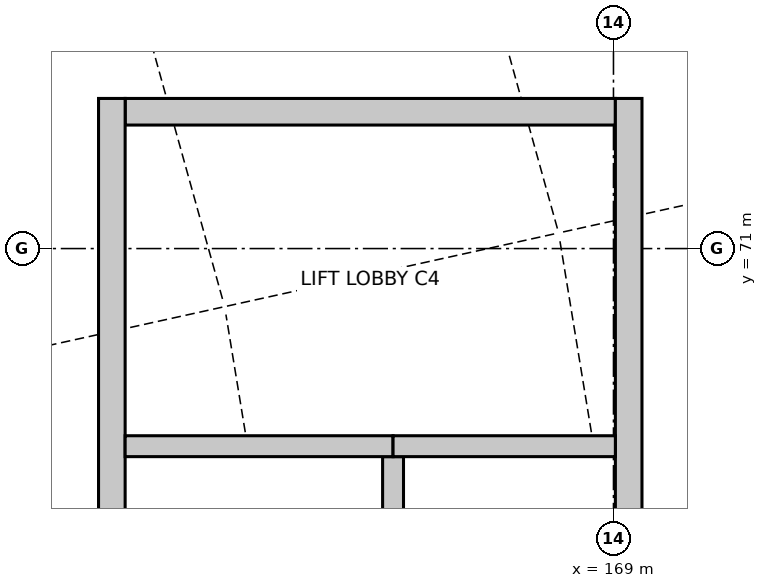
"""IFC4 building model, lengths in metres.
Left out: names, types, materials, properties, quantities, classifications, styles, units other than length and angle.
Written with IfcOpenShell. Run it as: python <this file> out.ifc"""

import sys

from ifc_helpers import new_model, si_unit, direction, frame, frame_2d, origin, place, context, subcontext, project, spatial, rectangle, extrude, element, fill, save


model = new_model("IFC4")
c1 = context("Model", 3, precision=1e-05, world=origin(), true_north=direction((0.0, 1.0)))
c2 = subcontext(c1, "Body", "Model", "MODEL_VIEW")
j1 = project(units=[si_unit("LENGTHUNIT", "METRE"), si_unit("PLANEANGLEUNIT", "RADIAN")], contexts=[c1])
p1 = place(None, origin())
s1 = spatial("IfcSite", under=j1, at=p1, CompositionType="ELEMENT")
p2 = place(p1, origin())
s2 = spatial("IfcBuilding", under=s1, at=p2, CompositionType="ELEMENT")
p3 = place(p2, frame((0.0, 0.0, 9.6)))
s3 = spatial("IfcBuildingStorey", under=s2, at=p3, CompositionType="ELEMENT", Elevation=9.6)
p4 = place(p3, frame((162.575, 72.8, 0.0), z_axis=(0.0, 0.0, 1.0), x_axis=(1.0, 0.0, 0.0)))
e1 = element("IfcWall", 1, at=p4, inside=s3, PredefinedType="SHEAR", context=c2, shape_type="SweptSolid", body=[
    extrude(rectangle(XDim=6.45, YDim=0.35, at=frame_2d((3.225, 0.0))), origin(), (0.0, 0.0, 1.0), 4.55),
])
p5 = place(p4, frame((2.5, 0.0, 0.0)))
e2 = element("IfcOpeningElement", 2, at=p5, cuts=e1, PredefinedType="OPENING", context=c2, shape_type="SweptSolid", body=[
    extrude(rectangle(XDim=1.45, YDim=2.2, at=frame_2d((0.725, 1.1))), frame((0.0, 0.185, 0.0), z_axis=(0.0, -1.0, 0.0), x_axis=(1.0, 0.0, 0.0)), (0.0, 0.0, 1.0), 0.37),
])
for number, where, z_axis, x_axis in (
    (3, (162.4, 61.375, 0.0), (0.0, 0.0, 1.0), (0.0, 1.0, 0.0)),
    (4, (169.2, 61.375, 0.0), (0.0, 0.0, 1.0), (0.0, 1.0, 0.0)),
):
    element("IfcWall", number, at=place(p3, frame(where, z_axis=z_axis, x_axis=x_axis)), inside=s3, PredefinedType="SHEAR", context=c2, shape_type="SweptSolid", body=[
        extrude(rectangle(XDim=11.6, YDim=0.35, at=frame_2d((5.8, 0.0))), origin(), (0.0, 0.0, 1.0), 4.55),
    ])
p6 = place(p3, frame((166.1, 61.375, 0.0), z_axis=(0.0, 0.0, 1.0), x_axis=(0.0, 1.0, 0.0)))
e5 = element("IfcWall", 5, at=p6, inside=s3, PredefinedType="SHEAR", context=c2, shape_type="SweptSolid", body=[
    extrude(rectangle(XDim=6.887, YDim=0.275, at=frame_2d((3.444, 0.0))), origin(), (0.0, 0.0, 1.0), 4.55),
])
p7 = place(p3, frame((162.575, 68.4, 0.0), z_axis=(0.0, 0.0, 1.0), x_axis=(1.0, 0.0, 0.0)))
e6 = element("IfcWall", 6, at=p7, inside=s3, PredefinedType="SHEAR", context=c2, shape_type="SweptSolid", body=[
    extrude(rectangle(XDim=3.525, YDim=0.275, at=frame_2d((1.763, 0.0))), origin(), (0.0, 0.0, 1.0), 4.55),
])
p8 = place(p7, frame((1.785, 0.0, 0.0)))
e7 = element("IfcOpeningElement", 7, at=p8, cuts=e6, PredefinedType="OPENING", context=c2, shape_type="SweptSolid", body=[
    extrude(rectangle(XDim=1.25, YDim=2.15, at=frame_2d((0.625, 1.075))), frame((0.0, 0.147, 0.0), z_axis=(0.0, -1.0, 0.0), x_axis=(1.0, 0.0, 0.0)), (0.0, 0.0, 1.0), 0.295),
])
p9 = place(p3, frame((166.1, 68.4, 0.0), z_axis=(0.0, 0.0, 1.0), x_axis=(1.0, 0.0, 0.0)))
e8 = element("IfcWall", 8, at=p9, inside=s3, PredefinedType="SHEAR", context=c2, shape_type="SweptSolid", body=[
    extrude(rectangle(XDim=2.925, YDim=0.275, at=frame_2d((1.462, 0.0))), origin(), (0.0, 0.0, 1.0), 4.55),
])
p10 = place(p9, frame((0.982, 0.0, 0.0)))
e9 = element("IfcOpeningElement", 9, at=p10, cuts=e8, PredefinedType="OPENING", context=c2, shape_type="SweptSolid", body=[
    extrude(rectangle(XDim=1.1, YDim=2.15, at=frame_2d((0.55, 1.075))), frame((0.0, 0.147, 0.0), z_axis=(0.0, -1.0, 0.0), x_axis=(1.0, 0.0, 0.0)), (0.0, 0.0, 1.0), 0.295),
])
p11 = place(p8, origin())
e10 = element("IfcDoor", 10, at=p11, inside=s3, OperationType="SINGLE_SWING_RIGHT", PredefinedType="DOOR", context=c2, shape_type="SweptSolid", body=[
    extrude(rectangle(XDim=1.25, YDim=2.15, at=frame_2d((0.625, 1.075))), frame((0.0, 0.025, 0.0), z_axis=(0.0, -1.0, 0.0), x_axis=(1.0, 0.0, 0.0)), (0.0, 0.0, 1.0), 0.05),
])
fill(e7, e10)
p12 = place(p10, origin())
e11 = element("IfcDoor", 11, at=p12, inside=s3, OperationType="DOUBLE_DOOR_SLIDING", PredefinedType="DOOR", context=c2, shape_type="SweptSolid", body=[
    extrude(rectangle(XDim=1.1, YDim=2.15, at=frame_2d((0.55, 1.075))), frame((0.0, 0.025, 0.0), z_axis=(0.0, -1.0, 0.0), x_axis=(1.0, 0.0, 0.0)), (0.0, 0.0, 1.0), 0.05),
])
fill(e9, e11)
p13 = place(p5, origin())
e12 = element("IfcDoor", 12, at=p13, inside=s3, OperationType="SINGLE_SWING_LEFT", PredefinedType="DOOR", context=c2, shape_type="SweptSolid", body=[
    extrude(rectangle(XDim=1.45, YDim=2.2, at=frame_2d((0.725, 1.1))), frame((0.0, 0.025, 0.0), z_axis=(0.0, -1.0, 0.0), x_axis=(1.0, 0.0, 0.0)), (0.0, 0.0, 1.0), 0.05),
])
fill(e2, e12)
save(model, sys.argv[1])
